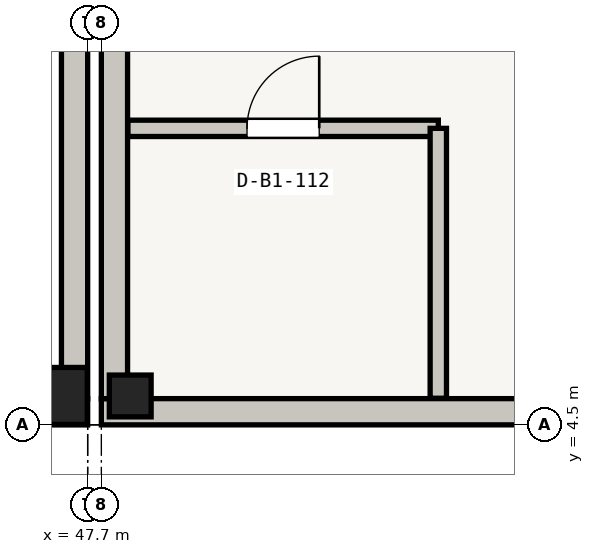
"""IFC4 building model, lengths in metres.
Left out: names, types, materials, properties, quantities, classifications, styles, units other than length and angle.
Written with IfcOpenShell. Run it as: python <this file> out.ifc"""

import sys

from ifc_helpers import new_model, si_unit, direction, frame, frame_2d, origin, origin_2d, place, context, subcontext, project, spatial, rectangle, extrude, element, fill, save


model = new_model("IFC4")
c1 = context("Model", 3, precision=1e-05, world=origin(), true_north=direction((0.0, 1.0)))
c2 = subcontext(c1, "Body", "Model", "MODEL_VIEW")
j1 = project(units=[si_unit("LENGTHUNIT", "METRE"), si_unit("PLANEANGLEUNIT", "RADIAN")], contexts=[c1])
p1 = place(None, origin())
s1 = spatial("IfcSite", under=j1, at=p1, CompositionType="ELEMENT")
p2 = place(p1, origin())
s2 = spatial("IfcBuilding", under=s1, at=p2, CompositionType="ELEMENT")
p3 = place(p2, frame((0.0, 0.0, -4.5)))
s3 = spatial("IfcBuildingStorey", under=s2, at=p3, CompositionType="ELEMENT", Elevation=-4.5)
p4 = place(p3, frame((47.32, 4.88, -0.42), z_axis=(0.0, 0.0, 1.0), x_axis=(1.0, 0.0, 0.0)))
e1 = element("IfcColumn", 1, at=p4, inside=s3, PredefinedType="COLUMN", context=c2, shape_type="SweptSolid", body=[
    extrude(rectangle(XDim=0.75, YDim=0.75, at=origin_2d()), origin(), (0.0, 0.0, 1.0), 4.64),
])
p5 = place(p3, frame((48.26, 4.88, -0.42), z_axis=(0.0, 0.0, 1.0), x_axis=(1.0, 0.0, 0.0)))
e2 = element("IfcColumn", 2, at=p5, inside=s3, PredefinedType="COLUMN", context=c2, shape_type="SweptSolid", body=[
    extrude(rectangle(XDim=0.55, YDim=0.55, at=origin_2d()), origin(), (0.0, 0.0, 1.0), 4.605),
])
p6 = place(p3, frame((47.528, 11.7, -0.42), z_axis=(0.0, 0.0, 1.0), x_axis=(0.0, -1.0, 0.0)))
e3 = element("IfcWall", 3, at=p6, inside=s3, PredefinedType="SOLIDWALL", context=c2, shape_type="SweptSolid", body=[
    extrude(rectangle(XDim=6.855, YDim=0.345, at=frame_2d((3.427, 0.0))), origin(), (0.0, 0.0, 1.0), 4.045),
])
p7 = place(p3, frame((47.7, 4.673, -0.42), z_axis=(0.0, 0.0, 1.0), x_axis=(-1.0, 0.0, 0.0)))
e4 = element("IfcWall", 4, at=p7, inside=s3, PredefinedType="SOLIDWALL", context=c2, shape_type="SweptSolid", body=[
    extrude(rectangle(XDim=7.2, YDim=0.345, at=frame_2d((3.6, 0.0))), origin(), (0.0, 0.0, 1.0), 3.675),
])
p8 = place(p3, frame((55.08, 4.673, -0.42), z_axis=(0.0, 0.0, 1.0), x_axis=(-1.0, 0.0, 0.0)))
e5 = element("IfcWall", 5, at=p8, inside=s3, PredefinedType="SOLIDWALL", context=c2, shape_type="SweptSolid", body=[
    extrude(rectangle(XDim=7.2, YDim=0.345, at=frame_2d((3.6, 0.0))), origin(), (0.0, 0.0, 1.0), 4.01),
])
p9 = place(p3, frame((48.052, 4.845, -0.42), z_axis=(0.0, 0.0, 1.0), x_axis=(0.0, 1.0, 0.0)))
e6 = element("IfcWall", 6, at=p9, inside=s3, PredefinedType="SOLIDWALL", context=c2, shape_type="SweptSolid", body=[
    extrude(rectangle(XDim=6.855, YDim=0.345, at=frame_2d((3.427, 0.0))), origin(), (0.0, 0.0, 1.0), 4.04),
])
p10 = place(p3, frame((48.23, 8.401, 0.0), z_axis=(0.0, 0.0, 1.0), x_axis=(1.0, 0.0, 0.0)))
e7 = element("IfcWall", 7, at=p10, inside=s3, PredefinedType="PLUMBINGWALL", context=c2, shape_type="SweptSolid", body=[
    extrude(rectangle(XDim=4.083, YDim=0.215, at=frame_2d((2.042, 0.0))), origin(), (0.0, 0.0, 1.0), 3.205),
])
p11 = place(p10, frame((1.567, 0.0, 0.0)))
e8 = element("IfcOpeningElement", 8, at=p11, cuts=e7, PredefinedType="OPENING", context=c2, shape_type="SweptSolid", body=[
    extrude(rectangle(XDim=0.95, YDim=2.05, at=frame_2d((0.475, 1.025))), frame((0.0, 0.107, 0.0), z_axis=(0.0, -1.0, 0.0), x_axis=(1.0, 0.0, 0.0)), (0.0, 0.0, 1.0), 0.215),
])
p12 = place(p3, frame((52.313, 8.401, 0.0), z_axis=(0.0, 0.0, 1.0), x_axis=(0.0, -1.0, 0.0)))
e9 = element("IfcWall", 9, at=p12, inside=s3, PredefinedType="PLUMBINGWALL", context=c2, shape_type="SweptSolid", body=[
    extrude(rectangle(XDim=3.551, YDim=0.215, at=frame_2d((1.775, 0.0))), origin(), (0.0, 0.0, 1.0), 3.205),
])
p13 = place(p11, origin())
e10 = element("IfcDoor", 10, at=p13, inside=s3, OperationType="SINGLE_SWING_RIGHT", PredefinedType="DOOR", context=c2, shape_type="SweptSolid", body=[
    extrude(rectangle(XDim=0.95, YDim=2.05, at=frame_2d((0.475, 1.025))), frame((0.0, 0.025, 0.0), z_axis=(0.0, -1.0, 0.0), x_axis=(1.0, 0.0, 0.0)), (0.0, 0.0, 1.0), 0.05),
])
fill(e8, e10)
save(model, sys.argv[1])
